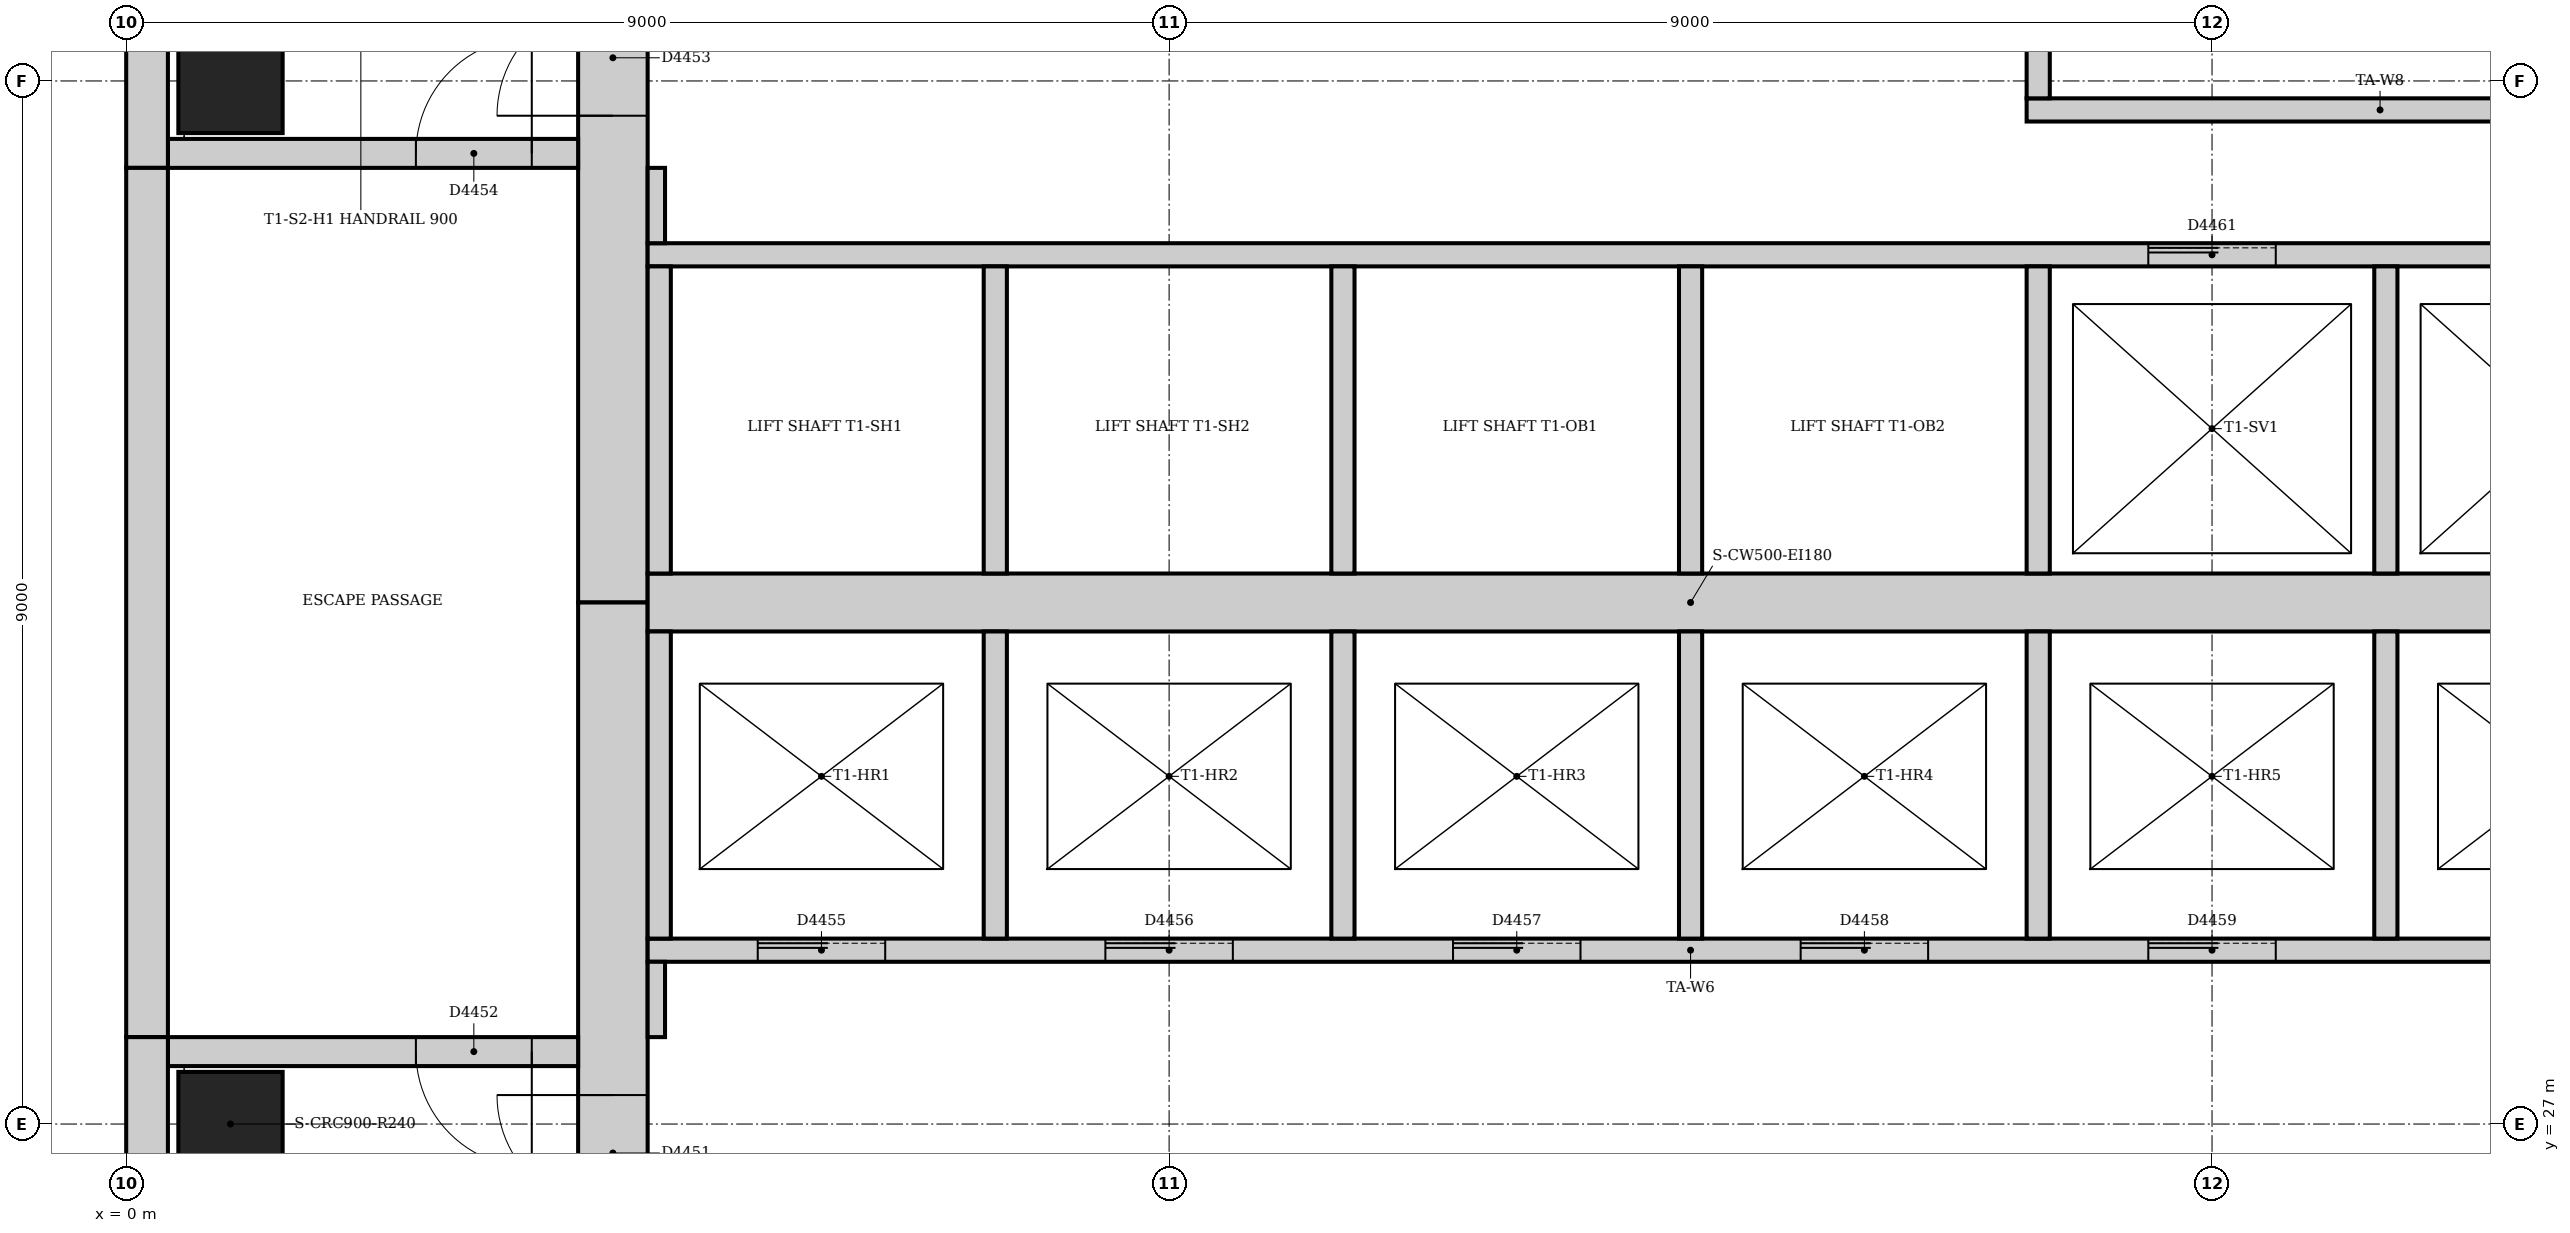
"""IFC4 building model, lengths in metres.
Left out: names, types, materials, properties, quantities, classifications, styles, units other than length and angle.
Written with IfcOpenShell. Run it as: python <this file> out.ifc"""

import sys

from ifc_helpers import new_model, si_unit, direction, frame, frame_2d, origin, origin_2d, place, context, subcontext, project, spatial, rectangle, extrude, element, fill, save


model = new_model("IFC4")
c1 = context("Model", 3, precision=1e-05, world=origin(), true_north=direction((0.0, 1.0)))
c2 = subcontext(c1, "Body", "Model", "MODEL_VIEW")
j1 = project(units=[si_unit("LENGTHUNIT", "METRE"), si_unit("PLANEANGLEUNIT", "RADIAN")], contexts=[c1])
p1 = place(None, origin())
s1 = spatial("IfcSite", under=j1, at=p1, CompositionType="ELEMENT")
p2 = place(p1, origin())
s2 = spatial("IfcBuilding", under=s1, at=p2, CompositionType="ELEMENT")
p3 = place(p2, frame((0.0, 0.0, 153.0)))
s3 = spatial("IfcBuildingStorey", under=s2, at=p3, CompositionType="ELEMENT", Elevation=153.0)
p4 = place(p3, frame((4.2, 42.0, 0.0), z_axis=(0.0, 0.0, 1.0), x_axis=(0.0, -1.0, 0.0)))
e1 = element("IfcWall", 1, at=p4, inside=s3, PredefinedType="SOLIDWALL", context=c2, shape_type="SweptSolid", body=[
    extrude(rectangle(XDim=10.5, YDim=0.6, at=frame_2d((5.25, 0.0))), origin(), (0.0, 0.0, 1.0), 4.0),
])
p5 = place(p4, frame((5.3, 0.0, 0.0)))
e2 = element("IfcOpeningElement", 2, at=p5, cuts=e1, PredefinedType="OPENING", context=c2, shape_type="SweptSolid", body=[
    extrude(rectangle(XDim=1.0, YDim=2.1, at=frame_2d((0.5, 1.05))), frame((0.0, 0.31, 0.0), z_axis=(0.0, -1.0, 0.0), x_axis=(1.0, 0.0, 0.0)), (0.0, 0.0, 1.0), 0.62),
])
p6 = place(p3, frame((4.2, 31.5, 0.0), z_axis=(0.0, 0.0, 1.0), x_axis=(0.0, -1.0, 0.0)))
e3 = element("IfcWall", 3, at=p6, inside=s3, PredefinedType="SOLIDWALL", context=c2, shape_type="SweptSolid", body=[
    extrude(rectangle(XDim=10.5, YDim=0.6, at=frame_2d((5.25, 0.0))), origin(), (0.0, 0.0, 1.0), 4.0),
])
p7 = place(p6, frame((4.25, 0.0, 0.0)))
e4 = element("IfcOpeningElement", 4, at=p7, cuts=e3, PredefinedType="OPENING", context=c2, shape_type="SweptSolid", body=[
    extrude(rectangle(XDim=1.0, YDim=2.1, at=frame_2d((0.5, 1.05))), frame((0.0, 0.31, 0.0), z_axis=(0.0, -1.0, 0.0), x_axis=(1.0, 0.0, 0.0)), (0.0, 0.0, 1.0), 0.62),
])
p8 = place(p3, frame((4.5, 31.5, 0.0), z_axis=(0.0, 0.0, 1.0), x_axis=(1.0, 0.0, 0.0)))
e5 = element("IfcWall", 5, at=p8, inside=s3, PredefinedType="SOLIDWALL", context=c2, shape_type="SweptSolid", body=[
    extrude(rectangle(XDim=18.0, YDim=0.5, at=frame_2d((9.0, 0.0))), origin(), (0.0, 0.0, 1.0), 4.0),
])
p9 = place(p3, frame((3.9, 27.625, 0.0), z_axis=(0.0, 0.0, 1.0), x_axis=(-1.0, 0.0, 0.0)))
e6 = element("IfcWall", 6, at=p9, inside=s3, PredefinedType="SOLIDWALL", context=c2, shape_type="SweptSolid", body=[
    extrude(rectangle(XDim=3.54, YDim=0.25, at=frame_2d((1.77, 0.0))), origin(), (0.0, 0.0, 1.0), 4.0),
])
p10 = place(p9, frame((0.4, 0.0, 0.0)))
e7 = element("IfcOpeningElement", 7, at=p10, cuts=e6, PredefinedType="OPENING", context=c2, shape_type="SweptSolid", body=[
    extrude(rectangle(XDim=1.0, YDim=2.1, at=frame_2d((0.5, 1.05))), frame((0.0, 0.135, 0.0), z_axis=(0.0, -1.0, 0.0), x_axis=(1.0, 0.0, 0.0)), (0.0, 0.0, 1.0), 0.27),
])
p11 = place(p3, frame((0.36, 35.375, 0.0), z_axis=(0.0, 0.0, 1.0), x_axis=(1.0, 0.0, 0.0)))
e8 = element("IfcWall", 8, at=p11, inside=s3, PredefinedType="SOLIDWALL", context=c2, shape_type="SweptSolid", body=[
    extrude(rectangle(XDim=3.54, YDim=0.25, at=frame_2d((1.77, 0.0))), origin(), (0.0, 0.0, 1.0), 4.0),
])
p12 = place(p11, frame((2.14, 0.0, 0.0)))
e9 = element("IfcOpeningElement", 9, at=p12, cuts=e8, PredefinedType="OPENING", context=c2, shape_type="SweptSolid", body=[
    extrude(rectangle(XDim=1.0, YDim=2.1, at=frame_2d((0.5, 1.05))), frame((0.0, 0.135, 0.0), z_axis=(0.0, -1.0, 0.0), x_axis=(1.0, 0.0, 0.0)), (0.0, 0.0, 1.0), 0.27),
])
for number, where, z_axis, x_axis in (
    (10, (0.9, 27.0, 0.0), (0.0, 0.0, 1.0), (1.0, 0.0, 0.0)),
    (11, (0.9, 36.0, 0.0), (0.0, 0.0, 1.0), (1.0, 0.0, 0.0)),
):
    element("IfcColumn", number, at=place(p3, frame(where, z_axis=z_axis, x_axis=x_axis)), inside=s3, PredefinedType="COLUMN", context=c2, shape_type="SweptSolid", body=[
        extrude(rectangle(XDim=0.9, YDim=0.9, at=origin_2d()), origin(), (0.0, 0.0, 1.0), 4.0),
    ])
p13 = place(p3, frame((0.18, 42.0, 0.0), z_axis=(0.0, 0.0, 1.0), x_axis=(0.0, -1.0, 0.0)))
e12 = element("IfcWall", 12, at=p13, inside=s3, PredefinedType="STANDARD", context=c2, shape_type="SweptSolid", body=[
    extrude(rectangle(XDim=6.75, YDim=0.36, at=frame_2d((3.375, 0.0))), origin(), (0.0, 0.0, 1.0), 3.85),
])
p14 = place(p3, frame((0.18, 35.25, 0.0), z_axis=(0.0, 0.0, 1.0), x_axis=(0.0, -1.0, 0.0)))
e13 = element("IfcWall", 13, at=p14, inside=s3, PredefinedType="STANDARD", context=c2, shape_type="SweptSolid", body=[
    extrude(rectangle(XDim=7.5, YDim=0.36, at=frame_2d((3.75, 0.0))), origin(), (0.0, 0.0, 1.0), 3.85),
])
p15 = place(p3, frame((0.18, 27.75, 0.0), z_axis=(0.0, 0.0, 1.0), x_axis=(0.0, -1.0, 0.0)))
e14 = element("IfcWall", 14, at=p15, inside=s3, PredefinedType="STANDARD", context=c2, shape_type="SweptSolid", body=[
    extrude(rectangle(XDim=6.75, YDim=0.36, at=frame_2d((3.375, 0.0))), origin(), (0.0, 0.0, 1.0), 3.85),
])
p16 = place(p3, frame((16.4, 35.75, 0.0), z_axis=(0.0, 0.0, 1.0), x_axis=(1.0, 0.0, 0.0)))
e15 = element("IfcWall", 15, at=p16, inside=s3, PredefinedType="PARTITIONING", context=c2, shape_type="SweptSolid", body=[
    extrude(rectangle(XDim=6.1, YDim=0.2, at=frame_2d((3.05, 0.0))), origin(), (0.0, 0.0, 1.0), 3.85),
])
p17 = place(p3, frame((16.5, 35.85, 0.0), z_axis=(0.0, 0.0, 1.0), x_axis=(0.0, 1.0, 0.0)))
e16 = element("IfcWall", 16, at=p17, inside=s3, PredefinedType="PARTITIONING", context=c2, shape_type="SweptSolid", body=[
    extrude(rectangle(XDim=2.55, YDim=0.2, at=frame_2d((1.275, 0.0))), origin(), (0.0, 0.0, 1.0), 3.85),
])
p18 = place(p3, frame((4.5, 28.5, 0.0), z_axis=(0.0, 0.0, 1.0), x_axis=(1.0, 0.0, 0.0)))
e17 = element("IfcWall", 17, at=p18, inside=s3, PredefinedType="PARTITIONING", context=c2, shape_type="SweptSolid", body=[
    extrude(rectangle(XDim=18.0, YDim=0.2, at=frame_2d((9.0, 0.0))), origin(), (0.0, 0.0, 1.0), 3.85),
])
p19 = place(p18, frame((0.95, 0.0, 0.0)))
e18 = element("IfcOpeningElement", 18, at=p19, cuts=e17, PredefinedType="OPENING", context=c2, shape_type="SweptSolid", body=[
    extrude(rectangle(XDim=1.1, YDim=2.1, at=frame_2d((0.55, 1.05))), frame((0.0, 0.11, 0.0), z_axis=(0.0, -1.0, 0.0), x_axis=(1.0, 0.0, 0.0)), (0.0, 0.0, 1.0), 0.22),
])
p20 = place(p18, frame((3.95, 0.0, 0.0)))
e19 = element("IfcOpeningElement", 19, at=p20, cuts=e17, PredefinedType="OPENING", context=c2, shape_type="SweptSolid", body=[
    extrude(rectangle(XDim=1.1, YDim=2.1, at=frame_2d((0.55, 1.05))), frame((0.0, 0.11, 0.0), z_axis=(0.0, -1.0, 0.0), x_axis=(1.0, 0.0, 0.0)), (0.0, 0.0, 1.0), 0.22),
])
p21 = place(p18, frame((6.95, 0.0, 0.0)))
e20 = element("IfcOpeningElement", 20, at=p21, cuts=e17, PredefinedType="OPENING", context=c2, shape_type="SweptSolid", body=[
    extrude(rectangle(XDim=1.1, YDim=2.1, at=frame_2d((0.55, 1.05))), frame((0.0, 0.11, 0.0), z_axis=(0.0, -1.0, 0.0), x_axis=(1.0, 0.0, 0.0)), (0.0, 0.0, 1.0), 0.22),
])
p22 = place(p18, frame((9.95, 0.0, 0.0)))
e21 = element("IfcOpeningElement", 21, at=p22, cuts=e17, PredefinedType="OPENING", context=c2, shape_type="SweptSolid", body=[
    extrude(rectangle(XDim=1.1, YDim=2.1, at=frame_2d((0.55, 1.05))), frame((0.0, 0.11, 0.0), z_axis=(0.0, -1.0, 0.0), x_axis=(1.0, 0.0, 0.0)), (0.0, 0.0, 1.0), 0.22),
])
p23 = place(p18, frame((12.95, 0.0, 0.0)))
e22 = element("IfcOpeningElement", 22, at=p23, cuts=e17, PredefinedType="OPENING", context=c2, shape_type="SweptSolid", body=[
    extrude(rectangle(XDim=1.1, YDim=2.1, at=frame_2d((0.55, 1.05))), frame((0.0, 0.11, 0.0), z_axis=(0.0, -1.0, 0.0), x_axis=(1.0, 0.0, 0.0)), (0.0, 0.0, 1.0), 0.22),
])
p24 = place(p18, frame((15.95, 0.0, 0.0)))
e23 = element("IfcOpeningElement", 23, at=p24, cuts=e17, PredefinedType="OPENING", context=c2, shape_type="SweptSolid", body=[
    extrude(rectangle(XDim=1.1, YDim=2.1, at=frame_2d((0.55, 1.05))), frame((0.0, 0.11, 0.0), z_axis=(0.0, -1.0, 0.0), x_axis=(1.0, 0.0, 0.0)), (0.0, 0.0, 1.0), 0.22),
])
p25 = place(p3, frame((4.5, 34.5, 0.0), z_axis=(0.0, 0.0, 1.0), x_axis=(1.0, 0.0, 0.0)))
e24 = element("IfcWall", 24, at=p25, inside=s3, PredefinedType="PARTITIONING", context=c2, shape_type="SweptSolid", body=[
    extrude(rectangle(XDim=18.0, YDim=0.2, at=frame_2d((9.0, 0.0))), origin(), (0.0, 0.0, 1.0), 3.85),
])
p26 = place(p25, frame((12.95, 0.0, 0.0)))
e25 = element("IfcOpeningElement", 25, at=p26, cuts=e24, PredefinedType="OPENING", context=c2, shape_type="SweptSolid", body=[
    extrude(rectangle(XDim=1.1, YDim=2.1, at=frame_2d((0.55, 1.05))), frame((0.0, 0.11, 0.0), z_axis=(0.0, -1.0, 0.0), x_axis=(1.0, 0.0, 0.0)), (0.0, 0.0, 1.0), 0.22),
])
p27 = place(p25, frame((15.95, 0.0, 0.0)))
e26 = element("IfcOpeningElement", 26, at=p27, cuts=e24, PredefinedType="OPENING", context=c2, shape_type="SweptSolid", body=[
    extrude(rectangle(XDim=1.1, YDim=2.1, at=frame_2d((0.55, 1.05))), frame((0.0, 0.11, 0.0), z_axis=(0.0, -1.0, 0.0), x_axis=(1.0, 0.0, 0.0)), (0.0, 0.0, 1.0), 0.22),
])
for number, where, z_axis, x_axis in (
    (27, (4.6, 31.75, 0.0), (0.0, 0.0, 1.0), (0.0, 1.0, 0.0)),
    (28, (4.6, 28.6, 0.0), (0.0, 0.0, 1.0), (0.0, 1.0, 0.0)),
    (29, (7.5, 28.6, 0.0), (0.0, 0.0, 1.0), (0.0, 1.0, 0.0)),
    (30, (7.5, 31.75, 0.0), (0.0, 0.0, 1.0), (0.0, 1.0, 0.0)),
    (31, (10.5, 28.6, 0.0), (0.0, 0.0, 1.0), (0.0, 1.0, 0.0)),
    (32, (10.5, 31.75, 0.0), (0.0, 0.0, 1.0), (0.0, 1.0, 0.0)),
    (33, (13.5, 28.6, 0.0), (0.0, 0.0, 1.0), (0.0, 1.0, 0.0)),
    (34, (13.5, 31.75, 0.0), (0.0, 0.0, 1.0), (0.0, 1.0, 0.0)),
    (35, (16.5, 28.6, 0.0), (0.0, 0.0, 1.0), (0.0, 1.0, 0.0)),
    (36, (16.5, 31.75, 0.0), (0.0, 0.0, 1.0), (0.0, 1.0, 0.0)),
    (37, (19.5, 28.6, 0.0), (0.0, 0.0, 1.0), (0.0, 1.0, 0.0)),
    (38, (19.5, 31.75, 0.0), (0.0, 0.0, 1.0), (0.0, 1.0, 0.0)),
):
    element("IfcWall", number, at=place(p3, frame(where, z_axis=z_axis, x_axis=x_axis)), inside=s3, PredefinedType="PARTITIONING", context=c2, shape_type="SweptSolid", body=[
        extrude(rectangle(XDim=2.65, YDim=0.2, at=frame_2d((1.325, 0.0))), origin(), (0.0, 0.0, 1.0), 3.85),
    ])
for number, where, z_axis, x_axis in (
    (39, (4.575, 27.75, 0.0), (0.0, 0.0, 1.0), (0.0, 1.0, 0.0)),
    (40, (4.575, 34.6, 0.0), (0.0, 0.0, 1.0), (0.0, 1.0, 0.0)),
):
    element("IfcWall", number, at=place(p3, frame(where, z_axis=z_axis, x_axis=x_axis)), inside=s3, PredefinedType="PARTITIONING", context=c2, shape_type="SweptSolid", body=[
        extrude(rectangle(XDim=0.65, YDim=0.15, at=frame_2d((0.325, 0.0))), origin(), (0.0, 0.0, 1.0), 3.85),
    ])
p28 = place(p7, frame((1.0, 0.0, 0.0), z_axis=(0.0, 0.0, 1.0), x_axis=(-1.0, 0.0, 0.0)))
e41 = element("IfcDoor", 41, at=p28, inside=s3, OperationType="SINGLE_SWING_RIGHT", PredefinedType="DOOR", context=c2, shape_type="SweptSolid", body=[
    extrude(rectangle(XDim=1.0, YDim=2.1, at=frame_2d((0.5, 1.05))), frame((0.0, 0.025, 0.0), z_axis=(0.0, -1.0, 0.0), x_axis=(1.0, 0.0, 0.0)), (0.0, 0.0, 1.0), 0.05),
])
fill(e4, e41)
p29 = place(p10, origin())
e42 = element("IfcDoor", 42, at=p29, inside=s3, OperationType="SINGLE_SWING_LEFT", PredefinedType="DOOR", context=c2, shape_type="SweptSolid", body=[
    extrude(rectangle(XDim=1.0, YDim=2.1, at=frame_2d((0.5, 1.05))), frame((0.0, 0.025, 0.0), z_axis=(0.0, -1.0, 0.0), x_axis=(1.0, 0.0, 0.0)), (0.0, 0.0, 1.0), 0.05),
])
fill(e7, e42)
p30 = place(p5, frame((1.0, 0.0, 0.0), z_axis=(0.0, 0.0, 1.0), x_axis=(-1.0, 0.0, 0.0)))
e43 = element("IfcDoor", 43, at=p30, inside=s3, OperationType="SINGLE_SWING_LEFT", PredefinedType="DOOR", context=c2, shape_type="SweptSolid", body=[
    extrude(rectangle(XDim=1.0, YDim=2.1, at=frame_2d((0.5, 1.05))), frame((0.0, 0.025, 0.0), z_axis=(0.0, -1.0, 0.0), x_axis=(1.0, 0.0, 0.0)), (0.0, 0.0, 1.0), 0.05),
])
fill(e2, e43)
p31 = place(p12, origin())
e44 = element("IfcDoor", 44, at=p31, inside=s3, OperationType="SINGLE_SWING_RIGHT", PredefinedType="DOOR", context=c2, shape_type="SweptSolid", body=[
    extrude(rectangle(XDim=1.0, YDim=2.1, at=frame_2d((0.5, 1.05))), frame((0.0, 0.025, 0.0), z_axis=(0.0, -1.0, 0.0), x_axis=(1.0, 0.0, 0.0)), (0.0, 0.0, 1.0), 0.05),
])
fill(e9, e44)
p32 = place(p19, origin())
e45 = element("IfcDoor", 45, at=p32, inside=s3, OperationType="SLIDING_TO_LEFT", PredefinedType="DOOR", context=c2, shape_type="SweptSolid", body=[
    extrude(rectangle(XDim=1.1, YDim=2.1, at=frame_2d((0.55, 1.05))), frame((0.0, 0.025, 0.0), z_axis=(0.0, -1.0, 0.0), x_axis=(1.0, 0.0, 0.0)), (0.0, 0.0, 1.0), 0.05),
])
fill(e18, e45)
p33 = place(p20, origin())
e46 = element("IfcDoor", 46, at=p33, inside=s3, OperationType="SLIDING_TO_LEFT", PredefinedType="DOOR", context=c2, shape_type="SweptSolid", body=[
    extrude(rectangle(XDim=1.1, YDim=2.1, at=frame_2d((0.55, 1.05))), frame((0.0, 0.025, 0.0), z_axis=(0.0, -1.0, 0.0), x_axis=(1.0, 0.0, 0.0)), (0.0, 0.0, 1.0), 0.05),
])
fill(e19, e46)
p34 = place(p21, origin())
e47 = element("IfcDoor", 47, at=p34, inside=s3, OperationType="SLIDING_TO_LEFT", PredefinedType="DOOR", context=c2, shape_type="SweptSolid", body=[
    extrude(rectangle(XDim=1.1, YDim=2.1, at=frame_2d((0.55, 1.05))), frame((0.0, 0.025, 0.0), z_axis=(0.0, -1.0, 0.0), x_axis=(1.0, 0.0, 0.0)), (0.0, 0.0, 1.0), 0.05),
])
fill(e20, e47)
p35 = place(p22, origin())
e48 = element("IfcDoor", 48, at=p35, inside=s3, OperationType="SLIDING_TO_LEFT", PredefinedType="DOOR", context=c2, shape_type="SweptSolid", body=[
    extrude(rectangle(XDim=1.1, YDim=2.1, at=frame_2d((0.55, 1.05))), frame((0.0, 0.025, 0.0), z_axis=(0.0, -1.0, 0.0), x_axis=(1.0, 0.0, 0.0)), (0.0, 0.0, 1.0), 0.05),
])
fill(e21, e48)
p36 = place(p23, origin())
e49 = element("IfcDoor", 49, at=p36, inside=s3, OperationType="SLIDING_TO_LEFT", PredefinedType="DOOR", context=c2, shape_type="SweptSolid", body=[
    extrude(rectangle(XDim=1.1, YDim=2.1, at=frame_2d((0.55, 1.05))), frame((0.0, 0.025, 0.0), z_axis=(0.0, -1.0, 0.0), x_axis=(1.0, 0.0, 0.0)), (0.0, 0.0, 1.0), 0.05),
])
fill(e22, e49)
p37 = place(p26, origin())
e50 = element("IfcDoor", 50, at=p37, inside=s3, OperationType="SLIDING_TO_LEFT", PredefinedType="DOOR", context=c2, shape_type="SweptSolid", body=[
    extrude(rectangle(XDim=1.1, YDim=2.1, at=frame_2d((0.55, 1.05))), frame((0.0, 0.025, 0.0), z_axis=(0.0, -1.0, 0.0), x_axis=(1.0, 0.0, 0.0)), (0.0, 0.0, 1.0), 0.05),
])
fill(e25, e50)
save(model, sys.argv[1])
